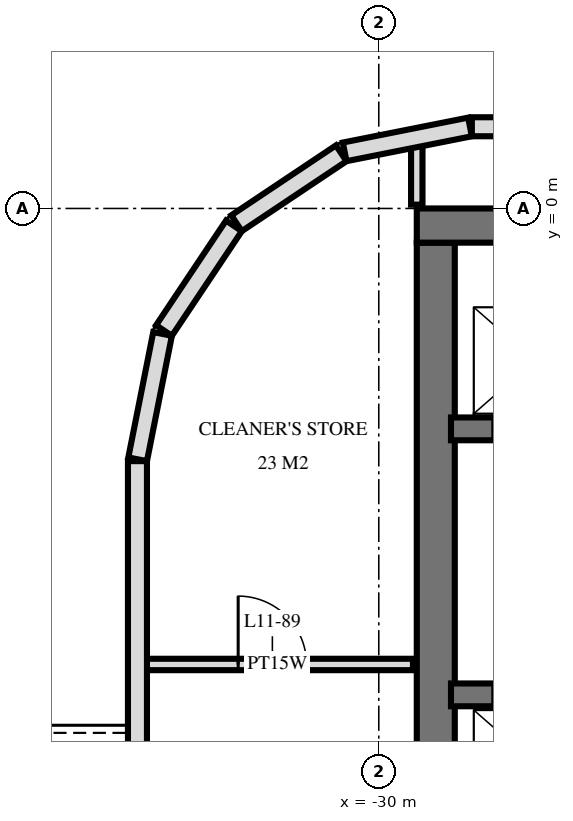
"""IFC4 building model, lengths in metres.
Left out: names, types, materials, properties, quantities, classifications, styles, units other than length and angle.
Written with IfcOpenShell. Run it as: python <this file> out.ifc"""

import sys

from ifc_helpers import new_model, si_unit, direction, frame, frame_2d, origin, place, context, subcontext, project, spatial, rectangle, extrude, element, fill, save


model = new_model("IFC4")
c1 = context("Model", 3, precision=1e-05, world=origin(), true_north=direction((0.0, 1.0)))
c2 = subcontext(c1, "Body", "Model", "MODEL_VIEW")
j1 = project(units=[si_unit("LENGTHUNIT", "METRE"), si_unit("PLANEANGLEUNIT", "RADIAN")], contexts=[c1])
p1 = place(None, origin())
s1 = spatial("IfcSite", under=j1, at=p1, CompositionType="ELEMENT")
p2 = place(p1, origin())
s2 = spatial("IfcBuilding", under=s1, at=p2, CompositionType="ELEMENT")
p3 = place(p2, frame((0.0, 0.0, 49.2)))
s3 = spatial("IfcBuildingStorey", under=s2, at=p3, CompositionType="ELEMENT", Elevation=49.2)
p4 = place(p3, frame((-29.5, -0.225, 0.0), z_axis=(0.0, 0.0, 1.0), x_axis=(1.0, 0.0, 0.0)))
e1 = element("IfcWall", 1, at=p4, inside=s3, PredefinedType="SHEAR", context=c2, shape_type="SweptSolid", body=[
    extrude(rectangle(XDim=19.5, YDim=0.45, at=frame_2d((9.75, 0.0))), origin(), (0.0, 0.0, 1.0), 3.6),
])
p5 = place(p3, frame((-29.25, -14.55, 0.0), z_axis=(0.0, 0.0, 1.0), x_axis=(0.0, 1.0, 0.0)))
e2 = element("IfcWall", 2, at=p5, inside=s3, PredefinedType="SHEAR", context=c2, shape_type="SweptSolid", body=[
    extrude(rectangle(XDim=14.1, YDim=0.5, at=frame_2d((7.05, 0.0))), origin(), (0.0, 0.0, 1.0), 3.6),
])
p6 = place(p3, frame((-29.05, -2.9, 0.0), z_axis=(0.0, 0.0, 1.0), x_axis=(1.0, 0.0, 0.0)))
e3 = element("IfcWall", 3, at=p6, inside=s3, PredefinedType="SHEAR", context=c2, shape_type="SweptSolid", body=[
    extrude(rectangle(XDim=18.7, YDim=0.3, at=frame_2d((9.35, 0.0))), origin(), (0.0, 0.0, 1.0), 3.6),
])
p7 = place(p6, frame((2.95, 0.0, 0.0)))
e4 = element("IfcOpeningElement", 4, at=p7, cuts=e3, PredefinedType="OPENING", context=c2, shape_type="SweptSolid", body=[
    extrude(rectangle(XDim=1.1, YDim=2.1, at=frame_2d((0.55, 1.05))), frame((0.0, 0.16, 0.0), z_axis=(0.0, -1.0, 0.0), x_axis=(1.0, 0.0, 0.0)), (0.0, 0.0, 1.0), 0.32),
])
p8 = place(p6, frame((0.55, 0.0, 0.0)))
e5 = element("IfcOpeningElement", 5, at=p8, cuts=e3, PredefinedType="OPENING", context=c2, shape_type="SweptSolid", body=[
    extrude(rectangle(XDim=1.1, YDim=2.1, at=frame_2d((0.55, 1.05))), frame((0.0, 0.16, 0.0), z_axis=(0.0, -1.0, 0.0), x_axis=(1.0, 0.0, 0.0)), (0.0, 0.0, 1.0), 0.32),
])
p9 = place(p6, frame((10.9, 0.0, 0.0)))
e6 = element("IfcOpeningElement", 6, at=p9, cuts=e3, PredefinedType="OPENING", context=c2, shape_type="SweptSolid", body=[
    extrude(rectangle(XDim=0.9, YDim=2.1, at=frame_2d((0.45, 1.05))), frame((0.0, 0.16, 0.0), z_axis=(0.0, -1.0, 0.0), x_axis=(1.0, 0.0, 0.0)), (0.0, 0.0, 1.0), 0.32),
])
p10 = place(p6, frame((16.85, 0.0, 0.0)))
e7 = element("IfcOpeningElement", 7, at=p10, cuts=e3, PredefinedType="OPENING", context=c2, shape_type="SweptSolid", body=[
    extrude(rectangle(XDim=1.0, YDim=2.1, at=frame_2d((0.5, 1.05))), frame((0.0, 0.16, 0.0), z_axis=(0.0, -1.0, 0.0), x_axis=(1.0, 0.0, 0.0)), (0.0, 0.0, 1.0), 0.32),
])
p11 = place(p6, frame((14.312, 0.0, 0.0)))
e8 = element("IfcOpeningElement", 8, at=p11, cuts=e3, PredefinedType="OPENING", context=c2, shape_type="SweptSolid", body=[
    extrude(rectangle(XDim=1.0, YDim=2.1, at=frame_2d((0.5, 1.05))), frame((0.0, 0.16, 0.0), z_axis=(0.0, -1.0, 0.0), x_axis=(1.0, 0.0, 0.0)), (0.0, 0.0, 1.0), 0.32),
])
p12 = place(p6, frame((12.887, 0.0, 0.0)))
e9 = element("IfcOpeningElement", 9, at=p12, cuts=e3, PredefinedType="OPENING", context=c2, shape_type="SweptSolid", body=[
    extrude(rectangle(XDim=1.0, YDim=2.1, at=frame_2d((0.5, 1.05))), frame((0.0, 0.16, 0.0), z_axis=(0.0, -1.0, 0.0), x_axis=(1.0, 0.0, 0.0)), (0.0, 0.0, 1.0), 0.32),
])
p13 = place(p6, frame((5.6, 0.0, 0.0)))
e10 = element("IfcOpeningElement", 10, at=p13, cuts=e3, PredefinedType="OPENING", context=c2, shape_type="SweptSolid", body=[
    extrude(rectangle(XDim=1.0, YDim=2.1, at=frame_2d((0.5, 1.05))), frame((0.0, 0.16, 0.0), z_axis=(0.0, -1.0, 0.0), x_axis=(1.0, 0.0, 0.0)), (0.0, 0.0, 1.0), 0.32),
])
p14 = place(p3, frame((-29.05, -6.4, 0.0), z_axis=(0.0, 0.0, 1.0), x_axis=(1.0, 0.0, 0.0)))
e11 = element("IfcWall", 11, at=p14, inside=s3, PredefinedType="SHEAR", context=c2, shape_type="SweptSolid", body=[
    extrude(rectangle(XDim=18.7, YDim=0.3, at=frame_2d((9.35, 0.0))), origin(), (0.0, 0.0, 1.0), 3.6),
])
p15 = place(p14, frame((2.95, 0.0, 0.0)))
e12 = element("IfcOpeningElement", 12, at=p15, cuts=e11, PredefinedType="OPENING", context=c2, shape_type="SweptSolid", body=[
    extrude(rectangle(XDim=1.1, YDim=2.1, at=frame_2d((0.55, 1.05))), frame((0.0, 0.16, 0.0), z_axis=(0.0, -1.0, 0.0), x_axis=(1.0, 0.0, 0.0)), (0.0, 0.0, 1.0), 0.32),
])
p16 = place(p14, frame((0.55, 0.0, 0.0)))
e13 = element("IfcOpeningElement", 13, at=p16, cuts=e11, PredefinedType="OPENING", context=c2, shape_type="SweptSolid", body=[
    extrude(rectangle(XDim=1.1, YDim=2.1, at=frame_2d((0.55, 1.05))), frame((0.0, 0.16, 0.0), z_axis=(0.0, -1.0, 0.0), x_axis=(1.0, 0.0, 0.0)), (0.0, 0.0, 1.0), 0.32),
])
p17 = place(p14, frame((10.8, 0.0, 0.0)))
e14 = element("IfcOpeningElement", 14, at=p17, cuts=e11, PredefinedType="OPENING", context=c2, shape_type="SweptSolid", body=[
    extrude(rectangle(XDim=1.1, YDim=2.1, at=frame_2d((0.55, 1.05))), frame((0.0, 0.16, 0.0), z_axis=(0.0, -1.0, 0.0), x_axis=(1.0, 0.0, 0.0)), (0.0, 0.0, 1.0), 0.32),
])
p18 = place(p14, frame((5.6, 0.0, 0.0)))
e15 = element("IfcOpeningElement", 15, at=p18, cuts=e11, PredefinedType="OPENING", context=c2, shape_type="SweptSolid", body=[
    extrude(rectangle(XDim=1.0, YDim=2.1, at=frame_2d((0.5, 1.05))), frame((0.0, 0.16, 0.0), z_axis=(0.0, -1.0, 0.0), x_axis=(1.0, 0.0, 0.0)), (0.0, 0.0, 1.0), 0.32),
])
p19 = place(p3, frame((28.775, 1.075, 0.0), z_axis=(0.0, 0.0, 1.0), x_axis=(-1.0, 0.0, 0.0)))
e16 = element("IfcWall", 16, at=p19, inside=s3, PredefinedType="SOLIDWALL", context=c2, shape_type="SweptSolid", body=[
    extrude(rectangle(XDim=57.551, YDim=0.25, at=frame_2d((28.775, 0.0))), origin(), (0.0, 0.0, 1.0), 3.32),
])
p20 = place(p19, frame((25.575, 0.0, 0.3)))
e17 = element("IfcOpeningElement", 17, at=p20, cuts=e16, PredefinedType="OPENING", context=c2, shape_type="SweptSolid", body=[
    extrude(rectangle(XDim=2.4, YDim=2.1, at=frame_2d((1.2, 1.05))), frame((0.0, 0.135, 0.0), z_axis=(0.0, -1.0, 0.0), x_axis=(1.0, 0.0, 0.0)), (0.0, 0.0, 1.0), 0.27),
])
p21 = place(p19, frame((30.275, 0.0, 0.3)))
e18 = element("IfcOpeningElement", 18, at=p21, cuts=e16, PredefinedType="OPENING", context=c2, shape_type="SweptSolid", body=[
    extrude(rectangle(XDim=2.4, YDim=2.1, at=frame_2d((1.2, 1.05))), frame((0.0, 0.135, 0.0), z_axis=(0.0, -1.0, 0.0), x_axis=(1.0, 0.0, 0.0)), (0.0, 0.0, 1.0), 0.27),
])
p22 = place(p19, frame((33.275, 0.0, 0.3)))
e19 = element("IfcOpeningElement", 19, at=p22, cuts=e16, PredefinedType="OPENING", context=c2, shape_type="SweptSolid", body=[
    extrude(rectangle(XDim=2.4, YDim=2.1, at=frame_2d((1.2, 1.05))), frame((0.0, 0.135, 0.0), z_axis=(0.0, -1.0, 0.0), x_axis=(1.0, 0.0, 0.0)), (0.0, 0.0, 1.0), 0.27),
])
p23 = place(p3, frame((-28.8, 1.073, 0.0), z_axis=(0.0, 0.0, 1.0), x_axis=(-0.980803419081, -0.194999110559, 0.0)))
e20 = element("IfcWall", 20, at=p23, inside=s3, PredefinedType="SOLIDWALL", context=c2, shape_type="SweptSolid", body=[
    extrude(rectangle(XDim=1.681, YDim=0.25, at=frame_2d((0.841, 0.0))), origin(), (0.0, 0.0, 1.0), 3.32),
])
for number, where, z_axis, x_axis in (
    (21, (-30.494, 0.726, 0.0), (0.0, 0.0, 1.0), (-0.831, -0.556, 0.0)),
    (22, (-31.906, -0.229, 0.0), (0.0, 0.0, 1.0), (-0.556, -0.831, 0.0)),
):
    element("IfcWall", number, at=place(p3, frame(where, z_axis=z_axis, x_axis=x_axis)), inside=s3, PredefinedType="SOLIDWALL", context=c2, shape_type="SweptSolid", body=[
        extrude(rectangle(XDim=1.656, YDim=0.25, at=frame_2d((0.828, 0.0))), origin(), (0.0, 0.0, 1.0), 3.32),
    ])
p24 = place(p3, frame((-32.844, -1.651, 0.0), z_axis=(0.0, 0.0, 1.0), x_axis=(-0.19513878023, -0.980775640221, 0.0)))
e23 = element("IfcWall", 23, at=p24, inside=s3, PredefinedType="SOLIDWALL", context=c2, shape_type="SweptSolid", body=[
    extrude(rectangle(XDim=1.681, YDim=0.25, at=frame_2d((0.841, 0.0))), origin(), (0.0, 0.0, 1.0), 3.32),
])
p25 = place(p3, frame((-33.175, -3.325, 0.0), z_axis=(0.0, 0.0, 1.0), x_axis=(0.0, -1.0, 0.0)))
e24 = element("IfcWall", 24, at=p25, inside=s3, PredefinedType="SOLIDWALL", context=c2, shape_type="SweptSolid", body=[
    extrude(rectangle(XDim=21.551, YDim=0.25, at=frame_2d((10.775, 0.0))), origin(), (0.0, 0.0, 1.0), 3.32),
])
p26 = place(p25, frame((6.65, 0.0, 0.0)))
e25 = element("IfcOpeningElement", 25, at=p26, cuts=e24, PredefinedType="OPENING", context=c2, shape_type="SweptSolid", body=[
    extrude(rectangle(XDim=1.8, YDim=2.4, at=frame_2d((0.9, 1.2))), frame((0.0, 0.135, 0.0), z_axis=(0.0, -1.0, 0.0), x_axis=(1.0, 0.0, 0.0)), (0.0, 0.0, 1.0), 0.27),
])
p27 = place(p25, frame((12.275, 0.0, 0.3)))
e26 = element("IfcOpeningElement", 26, at=p27, cuts=e24, PredefinedType="OPENING", context=c2, shape_type="SweptSolid", body=[
    extrude(rectangle(XDim=1.2, YDim=2.1, at=frame_2d((0.6, 1.05))), frame((0.0, 0.135, 0.0), z_axis=(0.0, -1.0, 0.0), x_axis=(1.0, 0.0, 0.0)), (0.0, 0.0, 1.0), 0.27),
])
p28 = place(p25, frame((14.675, 0.0, 0.0)))
e27 = element("IfcOpeningElement", 27, at=p28, cuts=e24, PredefinedType="OPENING", context=c2, shape_type="SweptSolid", body=[
    extrude(rectangle(XDim=1.8, YDim=2.4, at=frame_2d((0.9, 1.2))), frame((0.0, 0.135, 0.0), z_axis=(0.0, -1.0, 0.0), x_axis=(1.0, 0.0, 0.0)), (0.0, 0.0, 1.0), 0.27),
])
p29 = place(p25, frame((18.875, 0.0, 0.0)))
e28 = element("IfcOpeningElement", 28, at=p29, cuts=e24, PredefinedType="OPENING", context=c2, shape_type="SweptSolid", body=[
    extrude(rectangle(XDim=1.8, YDim=2.4, at=frame_2d((0.9, 1.2))), frame((0.0, 0.135, 0.0), z_axis=(0.0, -1.0, 0.0), x_axis=(1.0, 0.0, 0.0)), (0.0, 0.0, 1.0), 0.27),
])
p30 = place(p3, frame((-29.5, 0.05, 0.0), z_axis=(0.0, 0.0, 1.0), x_axis=(0.0, 1.0, 0.0)))
e29 = element("IfcWall", 29, at=p30, inside=s3, PredefinedType="PARTITIONING", context=c2, shape_type="SweptSolid", body=[
    extrude(rectangle(XDim=0.827, YDim=0.15, at=frame_2d((0.414, 0.0))), origin(), (0.0, 0.0, 1.0), 3.32),
])
p31 = place(p3, frame((-33.12, -6.0, 0.0), z_axis=(0.0, 0.0, 1.0), x_axis=(1.0, 0.0, 0.0)))
e30 = element("IfcWall", 30, at=p31, inside=s3, PredefinedType="PLUMBINGWALL", context=c2, shape_type="SweptSolid", body=[
    extrude(rectangle(XDim=3.57, YDim=0.15, at=frame_2d((1.785, 0.0))), origin(), (0.0, 0.0, 1.0), 3.32),
])
p32 = place(p31, frame((1.27, 0.0, 0.0)))
e31 = element("IfcOpeningElement", 31, at=p32, cuts=e30, PredefinedType="OPENING", context=c2, shape_type="SweptSolid", body=[
    extrude(rectangle(XDim=0.9, YDim=2.1, at=frame_2d((0.45, 1.05))), frame((0.0, 0.085, 0.0), z_axis=(0.0, -1.0, 0.0), x_axis=(1.0, 0.0, 0.0)), (0.0, 0.0, 1.0), 0.17),
])
p33 = place(p32, origin())
e32 = element("IfcDoor", 32, at=p33, inside=s3, OperationType="SINGLE_SWING_RIGHT", PredefinedType="DOOR", context=c2, shape_type="SweptSolid", body=[
    extrude(rectangle(XDim=0.9, YDim=2.1, at=frame_2d((0.45, 1.05))), frame((0.0, 0.025, 0.0), z_axis=(0.0, -1.0, 0.0), x_axis=(1.0, 0.0, 0.0)), (0.0, 0.0, 1.0), 0.05),
])
fill(e31, e32)
save(model, sys.argv[1])
